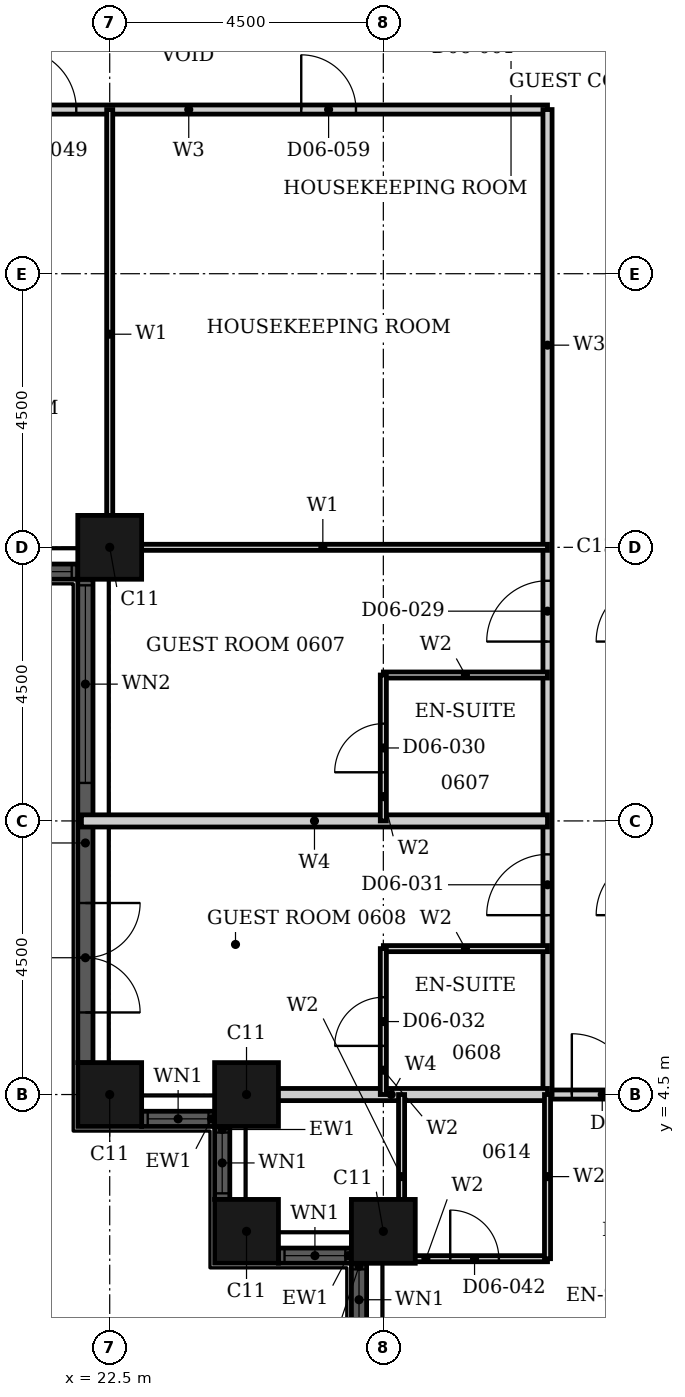
"""IFC4 building model, lengths in metres.
Left out: names, types, materials, properties, quantities, classifications, styles, units other than length and angle.
Written with IfcOpenShell. Run it as: python <this file> out.ifc"""

import sys

from ifc_helpers import new_model, si_unit, direction, frame, frame_2d, origin, origin_2d, place, context, subcontext, project, spatial, rectangle, hollow_rectangle, extrude, element, fill, save


model = new_model("IFC4")
c1 = context("Model", 3, precision=1e-05, world=origin(), true_north=direction((0.0, 1.0)))
c2 = subcontext(c1, "Body", "Model", "MODEL_VIEW")
j1 = project(units=[si_unit("LENGTHUNIT", "METRE"), si_unit("PLANEANGLEUNIT", "RADIAN")], contexts=[c1])
p1 = place(None, origin())
s1 = spatial("IfcSite", under=j1, at=p1, CompositionType="ELEMENT")
p2 = place(p1, origin())
s2 = spatial("IfcBuilding", under=s1, at=p2, CompositionType="ELEMENT")
p3 = place(p2, frame((0.0, 0.0, 33.6)))
s3 = spatial("IfcBuildingStorey", under=s2, at=p3, CompositionType="ELEMENT", Elevation=33.6)
for number, where, z_axis, x_axis in (
    (1, (22.5, 4.5, 0.0), (0.0, 0.0, 1.0), (1.0, 0.0, 0.0)),
    (2, (24.75, 4.5, 0.0), (0.0, 0.0, 1.0), (1.0, 0.0, 0.0)),
    (3, (24.75, 2.25, 0.0), (0.0, 0.0, 1.0), (1.0, 0.0, 0.0)),
    (4, (27.0, 2.25, 0.0), (0.0, 0.0, 1.0), (1.0, 0.0, 0.0)),
    (5, (22.5, 13.5, 0.0), (0.0, 0.0, 1.0), (1.0, 0.0, 0.0)),
):
    element("IfcColumn", number, at=place(p3, frame(where, z_axis=z_axis, x_axis=x_axis)), inside=s3, PredefinedType="COLUMN", context=c2, shape_type="SweptSolid", body=[
        extrude(hollow_rectangle(XDim=1.05, YDim=1.05, WallThickness=0.034, at=origin_2d()), origin(), (0.0, 0.0, 1.0), 3.6),
    ])
p4 = place(p3, frame((23.025, 4.1, 0.0), z_axis=(0.0, 0.0, 1.0), x_axis=(1.0, 0.0, 0.0)))
e6 = element("IfcWall", 6, at=p4, inside=s3, PredefinedType="SOLIDWALL", context=c2, shape_type="SweptSolid", body=[
    extrude(rectangle(XDim=1.2, YDim=0.25, at=frame_2d((0.6, 0.0))), origin(), (0.0, 0.0, 1.0), 3.6),
])
p5 = place(p4, frame((0.1, 0.0, 0.9)))
e7 = element("IfcOpeningElement", 7, at=p5, cuts=e6, PredefinedType="OPENING", context=c2, shape_type="SweptSolid", body=[
    extrude(rectangle(XDim=1.0, YDim=2.08, at=frame_2d((0.5, 1.04))), frame((0.0, 0.135, 0.0), z_axis=(0.0, -1.0, 0.0), x_axis=(1.0, 0.0, 0.0)), (0.0, 0.0, 1.0), 0.27),
])
p6 = place(p3, frame((24.35, 3.975, 0.0), z_axis=(0.0, 0.0, 1.0), x_axis=(0.0, -1.0, 0.0)))
e8 = element("IfcWall", 8, at=p6, inside=s3, PredefinedType="SOLIDWALL", context=c2, shape_type="SweptSolid", body=[
    extrude(rectangle(XDim=1.2, YDim=0.25, at=frame_2d((0.6, 0.0))), origin(), (0.0, 0.0, 1.0), 3.6),
])
p7 = place(p6, frame((0.1, 0.0, 0.9)))
e9 = element("IfcOpeningElement", 9, at=p7, cuts=e8, PredefinedType="OPENING", context=c2, shape_type="SweptSolid", body=[
    extrude(rectangle(XDim=1.0, YDim=2.08, at=frame_2d((0.5, 1.04))), frame((0.0, 0.135, 0.0), z_axis=(0.0, -1.0, 0.0), x_axis=(1.0, 0.0, 0.0)), (0.0, 0.0, 1.0), 0.27),
])
p8 = place(p3, frame((25.275, 1.85, 0.0), z_axis=(0.0, 0.0, 1.0), x_axis=(1.0, 0.0, 0.0)))
e10 = element("IfcWall", 10, at=p8, inside=s3, PredefinedType="SOLIDWALL", context=c2, shape_type="SweptSolid", body=[
    extrude(rectangle(XDim=1.2, YDim=0.25, at=frame_2d((0.6, 0.0))), origin(), (0.0, 0.0, 1.0), 3.6),
])
p9 = place(p8, frame((0.1, 0.0, 0.9)))
e11 = element("IfcOpeningElement", 11, at=p9, cuts=e10, PredefinedType="OPENING", context=c2, shape_type="SweptSolid", body=[
    extrude(rectangle(XDim=1.0, YDim=2.08, at=frame_2d((0.5, 1.04))), frame((0.0, 0.135, 0.0), z_axis=(0.0, -1.0, 0.0), x_axis=(1.0, 0.0, 0.0)), (0.0, 0.0, 1.0), 0.27),
])
p10 = place(p3, frame((26.6, 1.725, 0.0), z_axis=(0.0, 0.0, 1.0), x_axis=(0.0, -1.0, 0.0)))
e12 = element("IfcWall", 12, at=p10, inside=s3, PredefinedType="SOLIDWALL", context=c2, shape_type="SweptSolid", body=[
    extrude(rectangle(XDim=1.2, YDim=0.25, at=frame_2d((0.6, 0.0))), origin(), (0.0, 0.0, 1.0), 3.6),
])
p11 = place(p10, frame((0.1, 0.0, 0.9)))
e13 = element("IfcOpeningElement", 13, at=p11, cuts=e12, PredefinedType="OPENING", context=c2, shape_type="SweptSolid", body=[
    extrude(rectangle(XDim=1.0, YDim=2.08, at=frame_2d((0.5, 1.04))), frame((0.0, 0.135, 0.0), z_axis=(0.0, -1.0, 0.0), x_axis=(1.0, 0.0, 0.0)), (0.0, 0.0, 1.0), 0.27),
])
p12 = place(p3, frame((18.525, 13.1, 0.0), z_axis=(0.0, 0.0, 1.0), x_axis=(1.0, 0.0, 0.0)))
e14 = element("IfcWall", 14, at=p12, inside=s3, PredefinedType="SOLIDWALL", context=c2, shape_type="SweptSolid", body=[
    extrude(rectangle(XDim=3.45, YDim=0.25, at=frame_2d((1.725, 0.0))), origin(), (0.0, 0.0, 1.0), 3.6),
])
p13 = place(p12, frame((0.1, 0.0, 0.9)))
e15 = element("IfcOpeningElement", 15, at=p13, cuts=e14, PredefinedType="OPENING", context=c2, shape_type="SweptSolid", body=[
    extrude(rectangle(XDim=3.25, YDim=2.08, at=frame_2d((1.625, 1.04))), frame((0.0, 0.135, 0.0), z_axis=(0.0, -1.0, 0.0), x_axis=(1.0, 0.0, 0.0)), (0.0, 0.0, 1.0), 0.27),
])
p14 = place(p3, frame((22.1, 12.975, 0.0), z_axis=(0.0, 0.0, 1.0), x_axis=(0.0, -1.0, 0.0)))
e16 = element("IfcWall", 16, at=p14, inside=s3, PredefinedType="SOLIDWALL", context=c2, shape_type="SweptSolid", body=[
    extrude(rectangle(XDim=7.95, YDim=0.25, at=frame_2d((3.975, 0.0))), origin(), (0.0, 0.0, 1.0), 3.6),
])
p15 = place(p14, frame((0.1, 0.0, 0.9)))
e17 = element("IfcOpeningElement", 17, at=p15, cuts=e16, PredefinedType="OPENING", context=c2, shape_type="SweptSolid", body=[
    extrude(rectangle(XDim=3.25, YDim=2.08, at=frame_2d((1.625, 1.04))), frame((0.0, 0.135, 0.0), z_axis=(0.0, -1.0, 0.0), x_axis=(1.0, 0.0, 0.0)), (0.0, 0.0, 1.0), 0.27),
])
p16 = place(p14, frame((5.325, 0.0, 0.0)))
e18 = element("IfcOpeningElement", 18, at=p16, cuts=e16, PredefinedType="OPENING", context=c2, shape_type="SweptSolid", body=[
    extrude(rectangle(XDim=1.8, YDim=2.4, at=frame_2d((0.9, 1.2))), frame((0.0, 0.135, 0.0), z_axis=(0.0, -1.0, 0.0), x_axis=(1.0, 0.0, 0.0)), (0.0, 0.0, 1.0), 0.27),
])
p17 = place(p3, frame((18.0, 20.7, 0.0), z_axis=(0.0, 0.0, 1.0), x_axis=(1.0, 0.0, 0.0)))
e19 = element("IfcWall", 19, at=p17, inside=s3, PredefinedType="PARTITIONING", context=c2, shape_type="SweptSolid", body=[
    extrude(rectangle(XDim=11.7, YDim=0.15, at=frame_2d((5.85, 0.0))), origin(), (0.0, 0.0, 1.0), 3.3),
])
p18 = place(p17, frame((2.95, 0.0, 0.0)))
e20 = element("IfcOpeningElement", 20, at=p18, cuts=e19, PredefinedType="OPENING", context=c2, shape_type="SweptSolid", body=[
    extrude(rectangle(XDim=1.0, YDim=2.1, at=frame_2d((0.5, 1.05))), frame((0.0, 0.085, 0.0), z_axis=(0.0, -1.0, 0.0), x_axis=(1.0, 0.0, 0.0)), (0.0, 0.0, 1.0), 0.17),
])
p19 = place(p17, frame((7.65, 0.0, 0.0)))
e21 = element("IfcOpeningElement", 21, at=p19, cuts=e19, PredefinedType="OPENING", context=c2, shape_type="SweptSolid", body=[
    extrude(rectangle(XDim=0.9, YDim=2.1, at=frame_2d((0.45, 1.05))), frame((0.0, 0.085, 0.0), z_axis=(0.0, -1.0, 0.0), x_axis=(1.0, 0.0, 0.0)), (0.0, 0.0, 1.0), 0.17),
])
p20 = place(p3, frame((29.7, 4.5, 0.0), z_axis=(0.0, 0.0, 1.0), x_axis=(1.0, 0.0, 0.0)))
e22 = element("IfcWall", 22, at=p20, inside=s3, PredefinedType="PARTITIONING", context=c2, shape_type="SweptSolid", body=[
    extrude(rectangle(XDim=1.8, YDim=0.15, at=frame_2d((0.9, 0.0))), origin(), (0.0, 0.0, 1.0), 3.3),
])
p21 = place(p20, frame((0.4, 0.0, 0.0)))
e23 = element("IfcOpeningElement", 23, at=p21, cuts=e22, PredefinedType="OPENING", context=c2, shape_type="SweptSolid", body=[
    extrude(rectangle(XDim=1.0, YDim=2.1, at=frame_2d((0.5, 1.05))), frame((0.0, 0.085, 0.0), z_axis=(0.0, -1.0, 0.0), x_axis=(1.0, 0.0, 0.0)), (0.0, 0.0, 1.0), 0.17),
])
p22 = place(p3, frame((29.7, 4.5, 0.0), z_axis=(0.0, 0.0, 1.0), x_axis=(0.0, 1.0, 0.0)))
e24 = element("IfcWall", 24, at=p22, inside=s3, PredefinedType="PARTITIONING", context=c2, shape_type="SweptSolid", body=[
    extrude(rectangle(XDim=16.2, YDim=0.15, at=frame_2d((8.1, 0.0))), origin(), (0.0, 0.0, 1.0), 3.3),
])
p23 = place(p22, frame((7.45, 0.0, 0.0)))
e25 = element("IfcOpeningElement", 25, at=p23, cuts=e24, PredefinedType="OPENING", context=c2, shape_type="SweptSolid", body=[
    extrude(rectangle(XDim=1.0, YDim=2.1, at=frame_2d((0.5, 1.05))), frame((0.0, 0.085, 0.0), z_axis=(0.0, -1.0, 0.0), x_axis=(1.0, 0.0, 0.0)), (0.0, 0.0, 1.0), 0.17),
])
p24 = place(p22, frame((2.95, 0.0, 0.0)))
e26 = element("IfcOpeningElement", 26, at=p24, cuts=e24, PredefinedType="OPENING", context=c2, shape_type="SweptSolid", body=[
    extrude(rectangle(XDim=1.0, YDim=2.1, at=frame_2d((0.5, 1.05))), frame((0.0, 0.085, 0.0), z_axis=(0.0, -1.0, 0.0), x_axis=(1.0, 0.0, 0.0)), (0.0, 0.0, 1.0), 0.17),
])
p25 = place(p3, frame((22.31, 13.5, 0.0), z_axis=(0.0, 0.0, 1.0), x_axis=(1.0, 0.0, 0.0)))
e27 = element("IfcWall", 27, at=p25, inside=s3, PredefinedType="PARTITIONING", context=c2, shape_type="SweptSolid", body=[
    extrude(rectangle(XDim=7.39, YDim=0.1, at=frame_2d((3.695, 0.0))), origin(), (0.0, 0.0, 1.0), 2.38),
])
p26 = place(p3, frame((22.5, 13.31, 0.0), z_axis=(0.0, 0.0, 1.0), x_axis=(0.0, 1.0, 0.0)))
e28 = element("IfcWall", 28, at=p26, inside=s3, PredefinedType="PARTITIONING", context=c2, shape_type="SweptSolid", body=[
    extrude(rectangle(XDim=7.39, YDim=0.1, at=frame_2d((3.695, 0.0))), origin(), (0.0, 0.0, 1.0), 3.3),
])
p27 = place(p3, frame((24.56, 4.5, 0.0), z_axis=(0.0, 0.0, 1.0), x_axis=(1.0, 0.0, 0.0)))
e29 = element("IfcWall", 29, at=p27, inside=s3, PredefinedType="PARTITIONING", context=c2, shape_type="SweptSolid", body=[
    extrude(rectangle(XDim=5.14, YDim=0.2, at=frame_2d((2.57, 0.0))), origin(), (0.0, 0.0, 1.0), 3.3),
])
p28 = place(p3, frame((22.035, 9.0, 0.0), z_axis=(0.0, 0.0, 1.0), x_axis=(1.0, 0.0, 0.0)))
e30 = element("IfcWall", 30, at=p28, inside=s3, PredefinedType="PARTITIONING", context=c2, shape_type="SweptSolid", body=[
    extrude(rectangle(XDim=7.665, YDim=0.2, at=frame_2d((3.833, 0.0))), origin(), (0.0, 0.0, 1.0), 3.3),
])
p29 = place(p3, frame((27.3, 1.8, 0.0), z_axis=(0.0, 0.0, 1.0), x_axis=(1.0, 0.0, 0.0)))
e31 = element("IfcWall", 31, at=p29, inside=s3, PredefinedType="PARTITIONING", context=c2, shape_type="SweptSolid", body=[
    extrude(rectangle(XDim=2.4, YDim=0.1, at=frame_2d((1.2, 0.0))), origin(), (0.0, 0.0, 1.0), 3.3),
])
p30 = place(p29, frame((0.8, 0.0, 0.0)))
e32 = element("IfcOpeningElement", 32, at=p30, cuts=e31, PredefinedType="OPENING", context=c2, shape_type="SweptSolid", body=[
    extrude(rectangle(XDim=0.8, YDim=2.1, at=frame_2d((0.4, 1.05))), frame((0.0, 0.06, 0.0), z_axis=(0.0, -1.0, 0.0), x_axis=(1.0, 0.0, 0.0)), (0.0, 0.0, 1.0), 0.12),
])
for number, where, z_axis, x_axis in (
    (33, (27.0, 11.4, 0.0), (0.0, 0.0, 1.0), (1.0, 0.0, 0.0)),
    (34, (27.0, 6.9, 0.0), (0.0, 0.0, 1.0), (1.0, 0.0, 0.0)),
):
    element("IfcWall", number, at=place(p3, frame(where, z_axis=z_axis, x_axis=x_axis)), inside=s3, PredefinedType="PARTITIONING", context=c2, shape_type="SweptSolid", body=[
        extrude(rectangle(XDim=2.7, YDim=0.1, at=frame_2d((1.35, 0.0))), origin(), (0.0, 0.0, 1.0), 3.3),
    ])
p31 = place(p3, frame((27.0, 9.0, 0.0), z_axis=(0.0, 0.0, 1.0), x_axis=(0.0, 1.0, 0.0)))
e35 = element("IfcWall", 35, at=p31, inside=s3, PredefinedType="PARTITIONING", context=c2, shape_type="SweptSolid", body=[
    extrude(rectangle(XDim=2.4, YDim=0.1, at=frame_2d((1.2, 0.0))), origin(), (0.0, 0.0, 1.0), 2.58),
])
p32 = place(p31, frame((0.8, 0.0, 0.0)))
e36 = element("IfcOpeningElement", 36, at=p32, cuts=e35, PredefinedType="OPENING", context=c2, shape_type="SweptSolid", body=[
    extrude(rectangle(XDim=0.8, YDim=2.1, at=frame_2d((0.4, 1.05))), frame((0.0, 0.06, 0.0), z_axis=(0.0, -1.0, 0.0), x_axis=(1.0, 0.0, 0.0)), (0.0, 0.0, 1.0), 0.12),
])
p33 = place(p3, frame((27.0, 4.5, 0.0), z_axis=(0.0, 0.0, 1.0), x_axis=(0.0, 1.0, 0.0)))
e37 = element("IfcWall", 37, at=p33, inside=s3, PredefinedType="PARTITIONING", context=c2, shape_type="SweptSolid", body=[
    extrude(rectangle(XDim=2.4, YDim=0.1, at=frame_2d((1.2, 0.0))), origin(), (0.0, 0.0, 1.0), 2.58),
])
p34 = place(p33, frame((0.8, 0.0, 0.0)))
e38 = element("IfcOpeningElement", 38, at=p34, cuts=e37, PredefinedType="OPENING", context=c2, shape_type="SweptSolid", body=[
    extrude(rectangle(XDim=0.8, YDim=2.1, at=frame_2d((0.4, 1.05))), frame((0.0, 0.06, 0.0), z_axis=(0.0, -1.0, 0.0), x_axis=(1.0, 0.0, 0.0)), (0.0, 0.0, 1.0), 0.12),
])
for number, where, z_axis, x_axis in (
    (39, (27.3, 1.8, 0.0), (0.0, 0.0, 1.0), (0.0, 1.0, 0.0)),
    (40, (29.7, 1.8, 0.0), (0.0, 0.0, 1.0), (0.0, 1.0, 0.0)),
):
    element("IfcWall", number, at=place(p3, frame(where, z_axis=z_axis, x_axis=x_axis)), inside=s3, PredefinedType="PARTITIONING", context=c2, shape_type="SweptSolid", body=[
        extrude(rectangle(XDim=2.7, YDim=0.1, at=frame_2d((1.35, 0.0))), origin(), (0.0, 0.0, 1.0), 3.3),
    ])
p35 = place(p5, origin())
e41 = element("IfcWindow", 41, at=p35, inside=s3, PartitioningType="SINGLE_PANEL", PredefinedType="WINDOW", context=c2, shape_type="SweptSolid", body=[
    extrude(rectangle(XDim=1.0, YDim=2.08, at=frame_2d((0.5, 1.04))), frame((0.0, 0.03, 0.0), z_axis=(0.0, -1.0, 0.0), x_axis=(1.0, 0.0, 0.0)), (0.0, 0.0, 1.0), 0.06),
])
fill(e7, e41)
p36 = place(p7, origin())
e42 = element("IfcWindow", 42, at=p36, inside=s3, PartitioningType="SINGLE_PANEL", PredefinedType="WINDOW", context=c2, shape_type="SweptSolid", body=[
    extrude(rectangle(XDim=1.0, YDim=2.08, at=frame_2d((0.5, 1.04))), frame((0.0, 0.03, 0.0), z_axis=(0.0, -1.0, 0.0), x_axis=(1.0, 0.0, 0.0)), (0.0, 0.0, 1.0), 0.06),
])
fill(e9, e42)
p37 = place(p9, origin())
e43 = element("IfcWindow", 43, at=p37, inside=s3, PartitioningType="SINGLE_PANEL", PredefinedType="WINDOW", context=c2, shape_type="SweptSolid", body=[
    extrude(rectangle(XDim=1.0, YDim=2.08, at=frame_2d((0.5, 1.04))), frame((0.0, 0.03, 0.0), z_axis=(0.0, -1.0, 0.0), x_axis=(1.0, 0.0, 0.0)), (0.0, 0.0, 1.0), 0.06),
])
fill(e11, e43)
p38 = place(p11, origin())
e44 = element("IfcWindow", 44, at=p38, inside=s3, PartitioningType="SINGLE_PANEL", PredefinedType="WINDOW", context=c2, shape_type="SweptSolid", body=[
    extrude(rectangle(XDim=1.0, YDim=2.08, at=frame_2d((0.5, 1.04))), frame((0.0, 0.03, 0.0), z_axis=(0.0, -1.0, 0.0), x_axis=(1.0, 0.0, 0.0)), (0.0, 0.0, 1.0), 0.06),
])
fill(e13, e44)
p39 = place(p13, origin())
e45 = element("IfcWindow", 45, at=p39, inside=s3, PartitioningType="SINGLE_PANEL", PredefinedType="WINDOW", context=c2, shape_type="SweptSolid", body=[
    extrude(rectangle(XDim=3.25, YDim=2.08, at=frame_2d((1.625, 1.04))), frame((0.0, 0.03, 0.0), z_axis=(0.0, -1.0, 0.0), x_axis=(1.0, 0.0, 0.0)), (0.0, 0.0, 1.0), 0.06),
])
fill(e15, e45)
p40 = place(p15, origin())
e46 = element("IfcWindow", 46, at=p40, inside=s3, PartitioningType="SINGLE_PANEL", PredefinedType="WINDOW", context=c2, shape_type="SweptSolid", body=[
    extrude(rectangle(XDim=3.25, YDim=2.08, at=frame_2d((1.625, 1.04))), frame((0.0, 0.03, 0.0), z_axis=(0.0, -1.0, 0.0), x_axis=(1.0, 0.0, 0.0)), (0.0, 0.0, 1.0), 0.06),
])
fill(e17, e46)
p41 = place(p16, origin())
e47 = element("IfcDoor", 47, at=p41, inside=s3, OperationType="DOUBLE_DOOR_SINGLE_SWING", PredefinedType="DOOR", context=c2, shape_type="SweptSolid", body=[
    extrude(rectangle(XDim=1.8, YDim=2.4, at=frame_2d((0.9, 1.2))), frame((0.0, 0.025, 0.0), z_axis=(0.0, -1.0, 0.0), x_axis=(1.0, 0.0, 0.0)), (0.0, 0.0, 1.0), 0.05),
])
fill(e18, e47)
p42 = place(p23, origin())
e48 = element("IfcDoor", 48, at=p42, inside=s3, OperationType="SINGLE_SWING_RIGHT", PredefinedType="DOOR", context=c2, shape_type="SweptSolid", body=[
    extrude(rectangle(XDim=1.0, YDim=2.1, at=frame_2d((0.5, 1.05))), frame((0.0, 0.025, 0.0), z_axis=(0.0, -1.0, 0.0), x_axis=(1.0, 0.0, 0.0)), (0.0, 0.0, 1.0), 0.05),
])
fill(e25, e48)
p43 = place(p32, origin())
e49 = element("IfcDoor", 49, at=p43, inside=s3, OperationType="SINGLE_SWING_RIGHT", PredefinedType="DOOR", context=c2, shape_type="SweptSolid", body=[
    extrude(rectangle(XDim=0.8, YDim=2.1, at=frame_2d((0.4, 1.05))), frame((0.0, 0.025, 0.0), z_axis=(0.0, -1.0, 0.0), x_axis=(1.0, 0.0, 0.0)), (0.0, 0.0, 1.0), 0.05),
])
fill(e36, e49)
p44 = place(p24, origin())
e50 = element("IfcDoor", 50, at=p44, inside=s3, OperationType="SINGLE_SWING_RIGHT", PredefinedType="DOOR", context=c2, shape_type="SweptSolid", body=[
    extrude(rectangle(XDim=1.0, YDim=2.1, at=frame_2d((0.5, 1.05))), frame((0.0, 0.025, 0.0), z_axis=(0.0, -1.0, 0.0), x_axis=(1.0, 0.0, 0.0)), (0.0, 0.0, 1.0), 0.05),
])
fill(e26, e50)
p45 = place(p34, origin())
e51 = element("IfcDoor", 51, at=p45, inside=s3, OperationType="SINGLE_SWING_LEFT", PredefinedType="DOOR", context=c2, shape_type="SweptSolid", body=[
    extrude(rectangle(XDim=0.8, YDim=2.1, at=frame_2d((0.4, 1.05))), frame((0.0, 0.025, 0.0), z_axis=(0.0, -1.0, 0.0), x_axis=(1.0, 0.0, 0.0)), (0.0, 0.0, 1.0), 0.05),
])
fill(e38, e51)
p46 = place(p21, origin())
e52 = element("IfcDoor", 52, at=p46, inside=s3, OperationType="SINGLE_SWING_LEFT", PredefinedType="DOOR", context=c2, shape_type="SweptSolid", body=[
    extrude(rectangle(XDim=1.0, YDim=2.1, at=frame_2d((0.5, 1.05))), frame((0.0, 0.025, 0.0), z_axis=(0.0, -1.0, 0.0), x_axis=(1.0, 0.0, 0.0)), (0.0, 0.0, 1.0), 0.05),
])
fill(e23, e52)
p47 = place(p30, origin())
e53 = element("IfcDoor", 53, at=p47, inside=s3, OperationType="SINGLE_SWING_RIGHT", PredefinedType="DOOR", context=c2, shape_type="SweptSolid", body=[
    extrude(rectangle(XDim=0.8, YDim=2.1, at=frame_2d((0.4, 1.05))), frame((0.0, 0.025, 0.0), z_axis=(0.0, -1.0, 0.0), x_axis=(1.0, 0.0, 0.0)), (0.0, 0.0, 1.0), 0.05),
])
fill(e32, e53)
p48 = place(p18, origin())
e54 = element("IfcDoor", 54, at=p48, inside=s3, OperationType="SINGLE_SWING_RIGHT", PredefinedType="DOOR", context=c2, shape_type="SweptSolid", body=[
    extrude(rectangle(XDim=1.0, YDim=2.1, at=frame_2d((0.5, 1.05))), frame((0.0, 0.025, 0.0), z_axis=(0.0, -1.0, 0.0), x_axis=(1.0, 0.0, 0.0)), (0.0, 0.0, 1.0), 0.05),
])
fill(e20, e54)
p49 = place(p19, origin())
e55 = element("IfcDoor", 55, at=p49, inside=s3, OperationType="SINGLE_SWING_LEFT", PredefinedType="DOOR", context=c2, shape_type="SweptSolid", body=[
    extrude(rectangle(XDim=0.9, YDim=2.1, at=frame_2d((0.45, 1.05))), frame((0.0, 0.025, 0.0), z_axis=(0.0, -1.0, 0.0), x_axis=(1.0, 0.0, 0.0)), (0.0, 0.0, 1.0), 0.05),
])
fill(e21, e55)
save(model, sys.argv[1])
